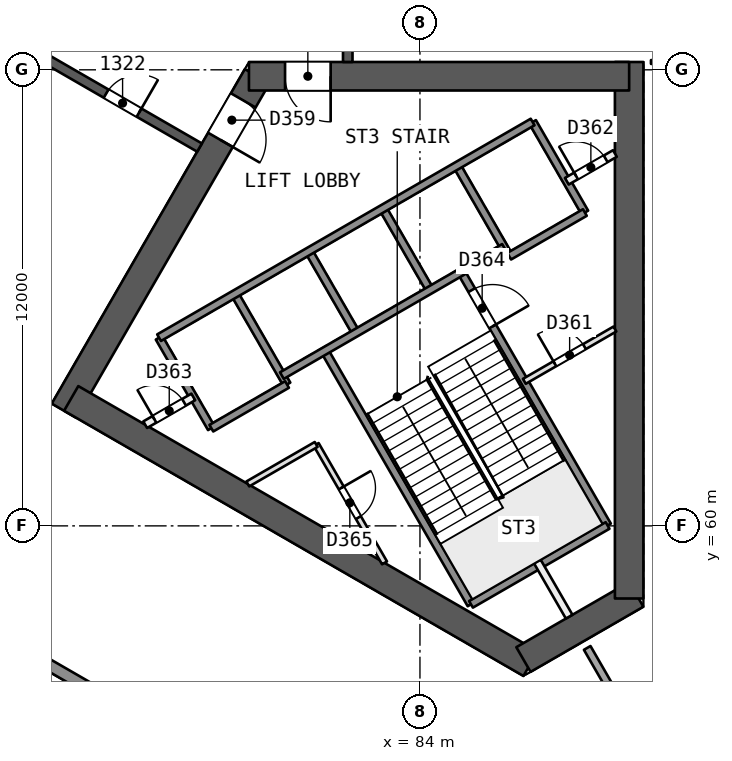
"""IFC4 building model, lengths in metres.
Left out: names, types, materials, properties, quantities, classifications, styles, units other than length and angle.
Written with IfcOpenShell. Run it as: python <this file> out.ifc"""

import sys

from ifc_helpers import new_model, si_unit, direction, frame, frame_2d, origin, place, context, subcontext, project, spatial, rectangle, extrude, element, fill, save


model = new_model("IFC4")
c1 = context("Model", 3, precision=1e-05, world=origin(), true_north=direction((0.0, 1.0)))
c2 = subcontext(c1, "Body", "Model", "MODEL_VIEW")
j1 = project(units=[si_unit("LENGTHUNIT", "METRE"), si_unit("PLANEANGLEUNIT", "RADIAN")], contexts=[c1])
p1 = place(None, origin())
s1 = spatial("IfcSite", under=j1, at=p1, CompositionType="ELEMENT")
p2 = place(p1, origin())
s2 = spatial("IfcBuilding", under=s1, at=p2, CompositionType="ELEMENT")
p3 = place(p2, frame((0.0, 0.0, 61.0)))
s3 = spatial("IfcBuildingStorey", under=s2, at=p3, CompositionType="ELEMENT", Elevation=61.0)
p4 = place(p3, frame((79.717, 71.831, 0.0), z_axis=(0.0, 0.0, 1.0), x_axis=(-0.499996230114, -0.866027580318, 0.0)))
e1 = element("IfcWall", 1, at=p4, inside=s3, PredefinedType="SHEAR", context=c2, shape_type="SweptSolid", body=[
    extrude(rectangle(XDim=10.164, YDim=0.75, at=frame_2d((5.082, 0.0))), origin(), (0.0, 0.0, 1.0), 3.7),
])
p5 = place(p4, frame((0.733, 0.0, 0.0)))
e2 = element("IfcOpeningElement", 2, at=p5, cuts=e1, PredefinedType="OPENING", context=c2, shape_type="SweptSolid", body=[
    extrude(rectangle(XDim=1.2, YDim=2.1, at=frame_2d((0.6, 1.05))), frame((0.0, 0.385, 0.0), z_axis=(0.0, -1.0, 0.0), x_axis=(1.0, 0.0, 0.0)), (0.0, 0.0, 1.0), 0.771),
])
p6 = place(p3, frame((74.822, 63.354, 0.0), z_axis=(0.0, 0.0, 1.0), x_axis=(0.8660248072, -0.500001033313, 0.0)))
e3 = element("IfcWall", 3, at=p6, inside=s3, PredefinedType="SHEAR", context=c2, shape_type="SweptSolid", body=[
    extrude(rectangle(XDim=13.958, YDim=0.75, at=frame_2d((6.979, 0.0))), origin(), (0.0, 0.0, 1.0), 3.7),
])
p7 = place(p3, frame((86.723, 56.483, 0.0), z_axis=(0.0, 0.0, 1.0), x_axis=(0.866017201164, 0.500014207086, 0.0)))
e4 = element("IfcWall", 4, at=p7, inside=s3, PredefinedType="SHEAR", context=c2, shape_type="SweptSolid", body=[
    extrude(rectangle(XDim=3.429, YDim=0.75, at=frame_2d((1.714, 0.0))), origin(), (0.0, 0.0, 1.0), 3.7),
])
p8 = place(p3, frame((89.505, 58.089, 0.0), z_axis=(0.0, 0.0, 1.0), x_axis=(0.0, 1.0, 0.0)))
e5 = element("IfcWall", 5, at=p8, inside=s3, PredefinedType="SHEAR", context=c2, shape_type="SweptSolid", body=[
    extrude(rectangle(XDim=14.117, YDim=0.75, at=frame_2d((7.059, 0.0))), origin(), (0.0, 0.0, 1.0), 3.7),
])
p9 = place(p3, frame((89.505, 71.831, 0.0), z_axis=(0.0, 0.0, 1.0), x_axis=(-1.0, 0.0, 0.0)))
e6 = element("IfcWall", 6, at=p9, inside=s3, PredefinedType="SHEAR", context=c2, shape_type="SweptSolid", body=[
    extrude(rectangle(XDim=10.005, YDim=0.75, at=frame_2d((5.002, 0.0))), origin(), (0.0, 0.0, 1.0), 3.7),
])
p10 = place(p9, frame((7.855, 0.0, 0.0)))
e7 = element("IfcOpeningElement", 7, at=p10, cuts=e6, PredefinedType="OPENING", context=c2, shape_type="SweptSolid", body=[
    extrude(rectangle(XDim=1.2, YDim=2.1, at=frame_2d((0.6, 1.05))), frame((0.0, 0.385, 0.0), z_axis=(0.0, -1.0, 0.0), x_axis=(1.0, 0.0, 0.0)), (0.0, 0.0, 1.0), 0.771),
])
p11 = place(p3, frame((82.1, 72.206, 0.0), z_axis=(0.0, 0.0, 1.0), x_axis=(0.0, 1.0, 0.0)))
e8 = element("IfcWall", 8, at=p11, inside=s3, PredefinedType="SHEAR", context=c2, shape_type="SweptSolid", body=[
    extrude(rectangle(XDim=15.588, YDim=0.25, at=frame_2d((7.794, 0.0))), origin(), (0.0, 0.0, 1.0), 3.2),
])
p12 = place(p11, frame((1.838, 0.0, 0.0)))
e9 = element("IfcOpeningElement", 9, at=p12, cuts=e8, PredefinedType="OPENING", context=c2, shape_type="SweptSolid", body=[
    extrude(rectangle(XDim=1.0, YDim=2.1, at=frame_2d((0.5, 1.05))), frame((0.0, 0.135, 0.0), z_axis=(0.0, -1.0, 0.0), x_axis=(1.0, 0.0, 0.0)), (0.0, 0.0, 1.0), 0.271),
])
p13 = place(p11, frame((9.006, 0.0, 0.0)))
e10 = element("IfcOpeningElement", 10, at=p13, cuts=e8, PredefinedType="OPENING", context=c2, shape_type="SweptSolid", body=[
    extrude(rectangle(XDim=1.1, YDim=2.1, at=frame_2d((0.55, 1.05))), frame((0.0, 0.135, 0.0), z_axis=(0.0, -1.0, 0.0), x_axis=(1.0, 0.0, 0.0)), (0.0, 0.0, 1.0), 0.271),
])
p14 = place(p11, frame((13.062, 0.0, 0.0)))
e11 = element("IfcOpeningElement", 11, at=p14, cuts=e8, PredefinedType="OPENING", context=c2, shape_type="SweptSolid", body=[
    extrude(rectangle(XDim=1.0, YDim=2.1, at=frame_2d((0.5, 1.05))), frame((0.0, 0.135, 0.0), z_axis=(0.0, -1.0, 0.0), x_axis=(1.0, 0.0, 0.0)), (0.0, 0.0, 1.0), 0.271),
])
p15 = place(p3, frame((64.7, 77.748, 0.0), z_axis=(0.0, 0.0, 1.0), x_axis=(0.866026492143, -0.499998114903, 0.0)))
e12 = element("IfcWall", 12, at=p15, inside=s3, PredefinedType="SHEAR", context=c2, shape_type="SweptSolid", body=[
    extrude(rectangle(XDim=15.588, YDim=0.25, at=frame_2d((7.794, 0.0))), origin(), (0.0, 0.0, 1.0), 3.2),
])
p16 = place(p15, frame((1.838, 0.0, 0.0)))
e13 = element("IfcOpeningElement", 13, at=p16, cuts=e12, PredefinedType="OPENING", context=c2, shape_type="SweptSolid", body=[
    extrude(rectangle(XDim=1.0, YDim=2.1, at=frame_2d((0.5, 1.05))), frame((0.0, 0.135, 0.0), z_axis=(0.0, -1.0, 0.0), x_axis=(1.0, 0.0, 0.0)), (0.0, 0.0, 1.0), 0.271),
])
p17 = place(p15, frame((8.694, 0.0, 0.0)))
e14 = element("IfcOpeningElement", 14, at=p17, cuts=e12, PredefinedType="OPENING", context=c2, shape_type="SweptSolid", body=[
    extrude(rectangle(XDim=1.1, YDim=2.1, at=frame_2d((0.55, 1.05))), frame((0.0, 0.135, 0.0), z_axis=(0.0, -1.0, 0.0), x_axis=(1.0, 0.0, 0.0)), (0.0, 0.0, 1.0), 0.271),
])
p18 = place(p15, frame((12.75, 0.0, 0.0)))
e15 = element("IfcOpeningElement", 15, at=p18, cuts=e12, PredefinedType="OPENING", context=c2, shape_type="SweptSolid", body=[
    extrude(rectangle(XDim=1.0, YDim=2.1, at=frame_2d((0.5, 1.05))), frame((0.0, 0.135, 0.0), z_axis=(0.0, -1.0, 0.0), x_axis=(1.0, 0.0, 0.0)), (0.0, 0.0, 1.0), 0.271),
])
p19 = place(p3, frame((90.079, 72.206, 0.0), z_axis=(0.0, 0.0, 1.0), x_axis=(1.0, 0.0, 0.0)))
e16 = element("IfcWall", 16, at=p19, inside=s3, PredefinedType="PARTITIONING", context=c2, shape_type="SweptSolid", body=[
    extrude(rectangle(XDim=5.646, YDim=0.1, at=frame_2d((2.823, 0.0))), origin(), (0.0, 0.0, 1.0), 3.2),
])
p20 = place(p19, frame((2.373, 0.0, 0.0)))
e17 = element("IfcOpeningElement", 17, at=p20, cuts=e16, PredefinedType="OPENING", context=c2, shape_type="SweptSolid", body=[
    extrude(rectangle(XDim=0.9, YDim=2.1, at=frame_2d((0.45, 1.05))), frame((0.0, 0.061, 0.0), z_axis=(0.0, -1.0, 0.0), x_axis=(1.0, 0.0, 0.0)), (0.0, 0.0, 1.0), 0.121),
])
p21 = place(p3, frame((88.401, 56.789, 0.0), z_axis=(0.0, 0.0, 1.0), x_axis=(0.499990030109, -0.866031159827, 0.0)))
e18 = element("IfcWall", 18, at=p21, inside=s3, PredefinedType="PARTITIONING", context=c2, shape_type="SweptSolid", body=[
    extrude(rectangle(XDim=9.478, YDim=0.2, at=frame_2d((4.739, 0.0))), origin(), (0.0, 0.0, 1.0), 3.2),
])
p22 = place(p3, frame((90.555, 46.916, 0.0), z_axis=(0.0, 0.0, 1.0), x_axis=(-0.866024926003, 0.500000827541, 0.0)))
e19 = element("IfcWall", 19, at=p22, inside=s3, PredefinedType="SOLIDWALL", context=c2, shape_type="SweptSolid", body=[
    extrude(rectangle(XDim=60.025, YDim=0.3, at=frame_2d((30.013, 0.0))), origin(), (0.0, 0.0, 1.0), 3.2),
])
p23 = place(p22, frame((28.813, 0.0, 0.0)))
e20 = element("IfcOpeningElement", 20, at=p23, cuts=e19, PredefinedType="OPENING", context=c2, shape_type="SweptSolid", body=[
    extrude(rectangle(XDim=2.4, YDim=2.4, at=frame_2d((1.2, 1.2))), frame((0.0, 0.161, 0.0), z_axis=(0.0, -1.0, 0.0), x_axis=(1.0, 0.0, 0.0)), (0.0, 0.0, 1.0), 0.321),
])
p24 = place(p22, frame((34.269, 0.0, 0.0)))
e21 = element("IfcOpeningElement", 21, at=p24, cuts=e19, PredefinedType="OPENING", context=c2, shape_type="SweptSolid", body=[
    extrude(rectangle(XDim=2.4, YDim=2.4, at=frame_2d((1.2, 1.2))), frame((0.0, 0.161, 0.0), z_axis=(0.0, -1.0, 0.0), x_axis=(1.0, 0.0, 0.0)), (0.0, 0.0, 1.0), 0.321),
])
p25 = place(p22, frame((46.558, 0.0, 0.0)))
e22 = element("IfcOpeningElement", 22, at=p25, cuts=e19, PredefinedType="OPENING", context=c2, shape_type="SweptSolid", body=[
    extrude(rectangle(XDim=2.4, YDim=2.4, at=frame_2d((1.2, 1.2))), frame((0.0, 0.161, 0.0), z_axis=(0.0, -1.0, 0.0), x_axis=(1.0, 0.0, 0.0)), (0.0, 0.0, 1.0), 0.321),
])
p26 = place(p22, frame((23.357, 0.0, 0.0)))
e23 = element("IfcOpeningElement", 23, at=p26, cuts=e19, PredefinedType="OPENING", context=c2, shape_type="SweptSolid", body=[
    extrude(rectangle(XDim=2.4, YDim=2.4, at=frame_2d((1.2, 1.2))), frame((0.0, 0.161, 0.0), z_axis=(0.0, -1.0, 0.0), x_axis=(1.0, 0.0, 0.0)), (0.0, 0.0, 1.0), 0.321),
])
p27 = place(p22, frame((11.109, 0.0, 0.0)))
e24 = element("IfcOpeningElement", 24, at=p27, cuts=e19, PredefinedType="OPENING", context=c2, shape_type="SweptSolid", body=[
    extrude(rectangle(XDim=2.4, YDim=2.4, at=frame_2d((1.2, 1.2))), frame((0.0, 0.161, 0.0), z_axis=(0.0, -1.0, 0.0), x_axis=(1.0, 0.0, 0.0)), (0.0, 0.0, 1.0), 0.321),
])
p28 = place(p3, frame((77.135, 64.952, 0.0), z_axis=(0.0, 0.0, 1.0), x_axis=(0.499996545922, -0.866027397988, 0.0)))
e25 = element("IfcWall", 25, at=p28, inside=s3, PredefinedType="SOLIDWALL", context=c2, shape_type="SweptSolid", body=[
    extrude(rectangle(XDim=2.75, YDim=0.2, at=frame_2d((1.375, 0.0))), origin(), (0.0, 0.0, 1.0), 3.2),
])
p29 = place(p3, frame((81.269, 62.142, 0.0), z_axis=(0.0, 0.0, 1.0), x_axis=(0.500043557135, -0.866000254601, 0.0)))
e26 = element("IfcWall", 26, at=p29, inside=s3, PredefinedType="PARTITIONING", context=c2, shape_type="SweptSolid", body=[
    extrude(rectangle(XDim=3.598, YDim=0.15, at=frame_2d((1.799, 0.0))), origin(), (0.0, 0.0, 1.0), 3.2),
])
p30 = place(p29, frame((1.322, 0.0, 0.0)))
e27 = element("IfcOpeningElement", 27, at=p30, cuts=e26, PredefinedType="OPENING", context=c2, shape_type="SweptSolid", body=[
    extrude(rectangle(XDim=0.9, YDim=2.1, at=frame_2d((0.45, 1.05))), frame((0.0, 0.085, 0.0), z_axis=(0.0, -1.0, 0.0), x_axis=(1.0, 0.0, 0.0)), (0.0, 0.0, 1.0), 0.171),
])
p31 = place(p3, frame((79.127, 66.102, 0.0), z_axis=(0.0, 0.0, 1.0), x_axis=(0.499996545922, -0.866027397988, 0.0)))
e28 = element("IfcWall", 28, at=p31, inside=s3, PredefinedType="SOLIDWALL", context=c2, shape_type="SweptSolid", body=[
    extrude(rectangle(XDim=2.75, YDim=0.2, at=frame_2d((1.375, 0.0))), origin(), (0.0, 0.0, 1.0), 3.2),
])
p32 = place(p3, frame((81.493, 64.604, 0.0), z_axis=(0.0, 0.0, 1.0), x_axis=(0.500006057782, -0.866021906294, 0.0)))
e29 = element("IfcWall", 29, at=p32, inside=s3, PredefinedType="SOLIDWALL", context=c2, shape_type="SweptSolid", body=[
    extrude(rectangle(XDim=7.7, YDim=0.2, at=frame_2d((3.85, 0.0))), origin(), (0.0, 0.0, 1.0), 3.2),
])
p33 = place(p3, frame((81.076, 67.227, 0.0), z_axis=(0.0, 0.0, 1.0), x_axis=(0.50000366821, -0.866023285932, 0.0)))
e30 = element("IfcWall", 30, at=p33, inside=s3, PredefinedType="SOLIDWALL", context=c2, shape_type="SweptSolid", body=[
    extrude(rectangle(XDim=2.48, YDim=0.2, at=frame_2d((1.24, 0.0))), origin(), (0.0, 0.0, 1.0), 3.2),
])
p34 = place(p3, frame((87.09, 59.06, 0.0), z_axis=(0.0, 0.0, 1.0), x_axis=(0.499937194881, -0.866061661301, 0.0)))
e31 = element("IfcWall", 31, at=p34, inside=s3, PredefinedType="PARTITIONING", context=c2, shape_type="SweptSolid", body=[
    extrude(rectangle(XDim=1.673, YDim=0.2, at=frame_2d((0.836, 0.0))), origin(), (0.0, 0.0, 1.0), 3.2),
])
p35 = place(p3, frame((83.024, 68.352, 0.0), z_axis=(0.0, 0.0, 1.0), x_axis=(0.50000366821, -0.866023285932, 0.0)))
e32 = element("IfcWall", 32, at=p35, inside=s3, PredefinedType="SOLIDWALL", context=c2, shape_type="SweptSolid", body=[
    extrude(rectangle(XDim=2.48, YDim=0.2, at=frame_2d((1.24, 0.0))), origin(), (0.0, 0.0, 1.0), 3.2),
])
p36 = place(p3, frame((85.087, 66.679, 0.0), z_axis=(0.0, 0.0, 1.0), x_axis=(0.500019787375, -0.866013979237, 0.0)))
e33 = element("IfcWall", 33, at=p36, inside=s3, PredefinedType="SOLIDWALL", context=c2, shape_type="SweptSolid", body=[
    extrude(rectangle(XDim=7.7, YDim=0.2, at=frame_2d((3.85, 0.0))), origin(), (0.0, 0.0, 1.0), 3.2),
])
p37 = place(p36, frame((0.55, 0.0, 0.0)))
e34 = element("IfcOpeningElement", 34, at=p37, cuts=e33, PredefinedType="OPENING", context=c2, shape_type="SweptSolid", body=[
    extrude(rectangle(XDim=1.1, YDim=2.1, at=frame_2d((0.55, 1.05))), frame((0.0, 0.11, 0.0), z_axis=(0.0, -1.0, 0.0), x_axis=(1.0, 0.0, 0.0)), (0.0, 0.0, 1.0), 0.221),
])
for number, where, z_axis, x_axis in (
    (35, (84.973, 69.477, 0.0), (0.0, 0.0, 1.0), (0.5, -0.866, 0.0)),
    (36, (86.965, 70.626, 0.0), (0.0, 0.0, 1.0), (0.5, -0.866, 0.0)),
):
    element("IfcWall", number, at=place(p3, frame(where, z_axis=z_axis, x_axis=x_axis)), inside=s3, PredefinedType="SOLIDWALL", context=c2, shape_type="SweptSolid", body=[
        extrude(rectangle(XDim=2.75, YDim=0.2, at=frame_2d((1.375, 0.0))), origin(), (0.0, 0.0, 1.0), 3.2),
    ])
p38 = place(p3, frame((77.135, 64.952, 0.0), z_axis=(0.0, 0.0, 1.0), x_axis=(0.866031916153, 0.499988720078, 0.0)))
e37 = element("IfcWall", 37, at=p38, inside=s3, PredefinedType="SOLIDWALL", context=c2, shape_type="SweptSolid", body=[
    extrude(rectangle(XDim=11.35, YDim=0.2, at=frame_2d((5.675, 0.0))), origin(), (0.0, 0.0, 1.0), 3.2),
])
p39 = place(p3, frame((76.77, 62.662, 0.0), z_axis=(0.0, 0.0, 1.0), x_axis=(0.866054810376, 0.49994906283, 0.0)))
e38 = element("IfcWall", 38, at=p39, inside=s3, PredefinedType="PARTITIONING", context=c2, shape_type="SweptSolid", body=[
    extrude(rectangle(XDim=1.461, YDim=0.2, at=frame_2d((0.73, 0.0))), origin(), (0.0, 0.0, 1.0), 3.2),
])
p40 = place(p39, frame((0.281, 0.0, 0.0)))
e39 = element("IfcOpeningElement", 39, at=p40, cuts=e38, PredefinedType="OPENING", context=c2, shape_type="SweptSolid", body=[
    extrude(rectangle(XDim=0.9, YDim=2.1, at=frame_2d((0.45, 1.05))), frame((0.0, 0.11, 0.0), z_axis=(0.0, -1.0, 0.0), x_axis=(1.0, 0.0, 0.0)), (0.0, 0.0, 1.0), 0.221),
])
p41 = place(p3, frame((87.865, 69.068, 0.0), z_axis=(0.0, 0.0, 1.0), x_axis=(0.865982457891, 0.500074377092, 0.0)))
e40 = element("IfcWall", 40, at=p41, inside=s3, PredefinedType="PARTITIONING", context=c2, shape_type="SweptSolid", body=[
    extrude(rectangle(XDim=1.461, YDim=0.2, at=frame_2d((0.73, 0.0))), origin(), (0.0, 0.0, 1.0), 3.2),
])
p42 = place(p41, frame((0.281, 0.0, 0.0)))
e41 = element("IfcOpeningElement", 41, at=p42, cuts=e40, PredefinedType="OPENING", context=c2, shape_type="SweptSolid", body=[
    extrude(rectangle(XDim=0.9, YDim=2.1, at=frame_2d((0.45, 1.05))), frame((0.0, 0.11, 0.0), z_axis=(0.0, -1.0, 0.0), x_axis=(1.0, 0.0, 0.0)), (0.0, 0.0, 1.0), 0.221),
])
p43 = place(p3, frame((80.367, 63.954, 0.0), z_axis=(0.0, 0.0, 1.0), x_axis=(0.866026575979, 0.499997969693, 0.0)))
e42 = element("IfcWall", 42, at=p43, inside=s3, PredefinedType="SOLIDWALL", context=c2, shape_type="SweptSolid", body=[
    extrude(rectangle(XDim=6.75, YDim=0.2, at=frame_2d((3.375, 0.0))), origin(), (0.0, 0.0, 1.0), 3.2),
])
p44 = place(p3, frame((78.51, 62.57, 0.0), z_axis=(0.0, 0.0, 1.0), x_axis=(0.866053019151, 0.499952165731, 0.0)))
e43 = element("IfcWall", 43, at=p44, inside=s3, PredefinedType="SOLIDWALL", context=c2, shape_type="SweptSolid", body=[
    extrude(rectangle(XDim=2.3, YDim=0.2, at=frame_2d((1.15, 0.0))), origin(), (0.0, 0.0, 1.0), 3.2),
])
p45 = place(p3, frame((86.348, 67.095, 0.0), z_axis=(0.0, 0.0, 1.0), x_axis=(0.86602648383, 0.499998129301, 0.0)))
e44 = element("IfcWall", 44, at=p45, inside=s3, PredefinedType="SOLIDWALL", context=c2, shape_type="SweptSolid", body=[
    extrude(rectangle(XDim=2.3, YDim=0.2, at=frame_2d((1.15, 0.0))), origin(), (0.0, 0.0, 1.0), 3.2),
])
p46 = place(p3, frame((79.47, 61.103, 0.0), z_axis=(0.0, 0.0, 1.0), x_axis=(0.866021168401, 0.500007335828, 0.0)))
e45 = element("IfcWall", 45, at=p46, inside=s3, PredefinedType="PARTITIONING", context=c2, shape_type="SweptSolid", body=[
    extrude(rectangle(XDim=2.077, YDim=0.15, at=frame_2d((1.039, 0.0))), origin(), (0.0, 0.0, 1.0), 3.2),
])
p47 = place(p3, frame((86.747, 63.804, 0.0), z_axis=(0.0, 0.0, 1.0), x_axis=(0.866023045711, 0.500004084281, 0.0)))
e46 = element("IfcWall", 46, at=p47, inside=s3, PredefinedType="PARTITIONING", context=c2, shape_type="SweptSolid", body=[
    extrude(rectangle(XDim=2.751, YDim=0.15, at=frame_2d((1.376, 0.0))), origin(), (0.0, 0.0, 1.0), 3.2),
])
p48 = place(p47, frame((0.926, 0.0, 0.0)))
e47 = element("IfcOpeningElement", 47, at=p48, cuts=e46, PredefinedType="OPENING", context=c2, shape_type="SweptSolid", body=[
    extrude(rectangle(XDim=0.9, YDim=2.1, at=frame_2d((0.45, 1.05))), frame((0.0, 0.085, 0.0), z_axis=(0.0, -1.0, 0.0), x_axis=(1.0, 0.0, 0.0)), (0.0, 0.0, 1.0), 0.171),
])
p49 = place(p3, frame((85.343, 57.935, 0.0), z_axis=(0.0, 0.0, 1.0), x_axis=(0.866004344652, 0.500036473714, 0.0)))
e48 = element("IfcWall", 48, at=p49, inside=s3, PredefinedType="SOLIDWALL", context=c2, shape_type="SweptSolid", body=[
    extrude(rectangle(XDim=4.15, YDim=0.2, at=frame_2d((2.075, 0.0))), origin(), (0.0, 0.0, 1.0), 3.2),
])
p50 = place(p18, origin())
e49 = element("IfcDoor", 49, at=p50, inside=s3, OperationType="SINGLE_SWING_RIGHT", PredefinedType="NOTDEFINED", context=c2, shape_type="SweptSolid", body=[
    extrude(rectangle(XDim=1.0, YDim=2.1, at=frame_2d((0.5, 1.05))), frame((0.0, 0.025, 0.0), z_axis=(0.0, -1.0, 0.0), x_axis=(1.0, 0.0, 0.0)), (0.0, 0.0, 1.0), 0.05),
])
fill(e15, e49)
p51 = place(p5, origin())
e50 = element("IfcDoor", 50, at=p51, inside=s3, OperationType="SINGLE_SWING_RIGHT", PredefinedType="NOTDEFINED", context=c2, shape_type="SweptSolid", body=[
    extrude(rectangle(XDim=1.2, YDim=2.1, at=frame_2d((0.6, 1.05))), frame((0.0, 0.025, 0.0), z_axis=(0.0, -1.0, 0.0), x_axis=(1.0, 0.0, 0.0)), (0.0, 0.0, 1.0), 0.05),
])
fill(e2, e50)
p52 = place(p10, origin())
e51 = element("IfcDoor", 51, at=p52, inside=s3, OperationType="SINGLE_SWING_LEFT", PredefinedType="NOTDEFINED", context=c2, shape_type="SweptSolid", body=[
    extrude(rectangle(XDim=1.2, YDim=2.1, at=frame_2d((0.6, 1.05))), frame((0.0, 0.025, 0.0), z_axis=(0.0, -1.0, 0.0), x_axis=(1.0, 0.0, 0.0)), (0.0, 0.0, 1.0), 0.05),
])
fill(e7, e51)
p53 = place(p48, origin())
e52 = element("IfcDoor", 52, at=p53, inside=s3, OperationType="SINGLE_SWING_LEFT", PredefinedType="NOTDEFINED", context=c2, shape_type="SweptSolid", body=[
    extrude(rectangle(XDim=0.9, YDim=2.1, at=frame_2d((0.45, 1.05))), frame((0.0, 0.025, 0.0), z_axis=(0.0, -1.0, 0.0), x_axis=(1.0, 0.0, 0.0)), (0.0, 0.0, 1.0), 0.05),
])
fill(e47, e52)
p54 = place(p42, origin())
e53 = element("IfcDoor", 53, at=p54, inside=s3, OperationType="SINGLE_SWING_LEFT", PredefinedType="NOTDEFINED", context=c2, shape_type="SweptSolid", body=[
    extrude(rectangle(XDim=0.9, YDim=2.1, at=frame_2d((0.45, 1.05))), frame((0.0, 0.025, 0.0), z_axis=(0.0, -1.0, 0.0), x_axis=(1.0, 0.0, 0.0)), (0.0, 0.0, 1.0), 0.05),
])
fill(e41, e53)
p55 = place(p40, origin())
e54 = element("IfcDoor", 54, at=p55, inside=s3, OperationType="SINGLE_SWING_LEFT", PredefinedType="NOTDEFINED", context=c2, shape_type="SweptSolid", body=[
    extrude(rectangle(XDim=0.9, YDim=2.1, at=frame_2d((0.45, 1.05))), frame((0.0, 0.025, 0.0), z_axis=(0.0, -1.0, 0.0), x_axis=(1.0, 0.0, 0.0)), (0.0, 0.0, 1.0), 0.05),
])
fill(e39, e54)
p56 = place(p37, origin())
e55 = element("IfcDoor", 55, at=p56, inside=s3, OperationType="SINGLE_SWING_RIGHT", PredefinedType="NOTDEFINED", context=c2, shape_type="SweptSolid", body=[
    extrude(rectangle(XDim=1.1, YDim=2.1, at=frame_2d((0.55, 1.05))), frame((0.0, 0.025, 0.0), z_axis=(0.0, -1.0, 0.0), x_axis=(1.0, 0.0, 0.0)), (0.0, 0.0, 1.0), 0.05),
])
fill(e34, e55)
p57 = place(p30, origin())
e56 = element("IfcDoor", 56, at=p57, inside=s3, OperationType="SINGLE_SWING_LEFT", PredefinedType="NOTDEFINED", context=c2, shape_type="SweptSolid", body=[
    extrude(rectangle(XDim=0.9, YDim=2.1, at=frame_2d((0.45, 1.05))), frame((0.0, 0.025, 0.0), z_axis=(0.0, -1.0, 0.0), x_axis=(1.0, 0.0, 0.0)), (0.0, 0.0, 1.0), 0.05),
])
fill(e27, e56)
save(model, sys.argv[1])
